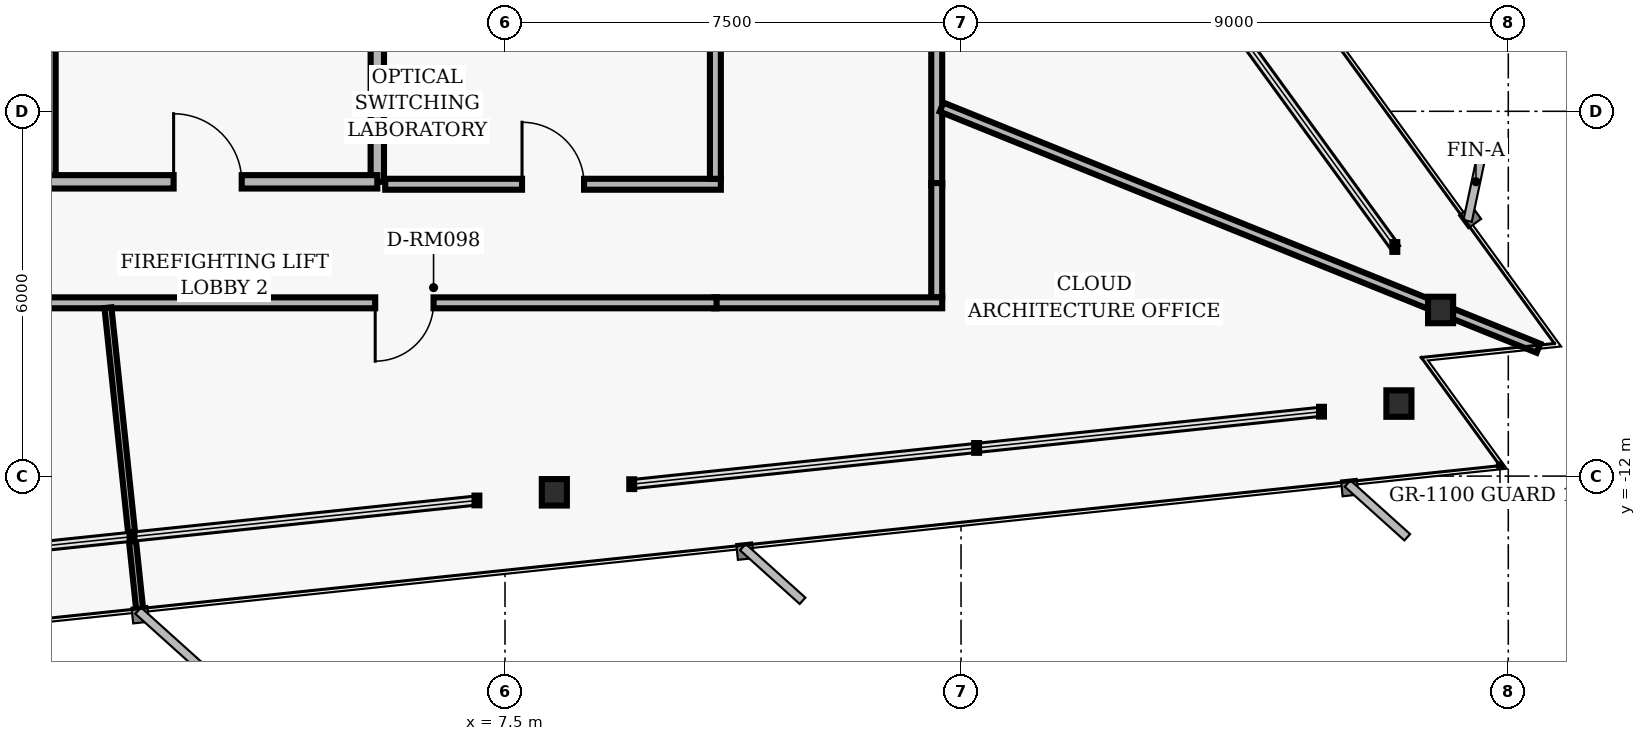
"""IFC4 building model, lengths in metres.
Left out: names, types, materials, properties, quantities, classifications, styles, units other than length and angle.
Written with IfcOpenShell. Run it as: python <this file> out.ifc"""

import sys

from ifc_helpers import new_model, si_unit, direction, frame, frame_2d, origin, origin_2d, place, context, subcontext, project, spatial, rectangle, i_section, extrude, element, fill, save


model = new_model("IFC4")
c1 = context("Model", 3, precision=1e-05, world=origin(), true_north=direction((0.0, 1.0)))
c2 = subcontext(c1, "Body", "Model", "MODEL_VIEW")
j1 = project(units=[si_unit("LENGTHUNIT", "METRE"), si_unit("PLANEANGLEUNIT", "RADIAN")], contexts=[c1])
p1 = place(None, origin())
s1 = spatial("IfcSite", under=j1, at=p1, CompositionType="ELEMENT")
p2 = place(p1, origin())
s2 = spatial("IfcBuilding", under=s1, at=p2, CompositionType="ELEMENT")
p3 = place(p2, frame((0.0, 0.0, 104.64)))
s3 = spatial("IfcBuildingStorey", under=s2, at=p3, CompositionType="ELEMENT", Elevation=104.64)
for number, where, z_axis, x_axis in (
    (1, (22.887, -9.268, 0.0), (0.0, 0.0, 1.0), (1.0, 0.0, 0.0)),
    (2, (8.311, -12.267, 0.0), (0.0, 0.0, 1.0), (1.0, 0.0, 0.0)),
    (3, (22.201, -10.807, 0.0), (0.0, 0.0, 1.0), (1.0, 0.0, 0.0)),
):
    element("IfcColumn", number, at=place(p3, frame(where, z_axis=z_axis, x_axis=x_axis)), inside=s3, PredefinedType="COLUMN", context=c2, shape_type="SweptSolid", body=[
        extrude(i_section(OverallWidth=0.412, OverallDepth=0.435, WebThickness=0.036, FlangeThickness=0.057, FilletRadius=0.022, at=origin_2d()), origin(), (0.0, 0.0, 1.0), 3.04),
    ])
p4 = place(p3, frame((5.4, -7.16, 0.0), z_axis=(0.0, 0.0, 1.0), x_axis=(0.0, 1.0, 0.0)))
e4 = element("IfcWall", 4, at=p4, inside=s3, PredefinedType="PARTITIONING", context=c2, shape_type="SweptSolid", body=[
    extrude(rectangle(XDim=2.71, YDim=0.22, at=frame_2d((1.355, 0.0))), origin(), (0.0, 0.0, 1.0), 2.763),
])
p5 = place(p3, frame((0.0, -7.16, 0.0), z_axis=(0.0, 0.0, 1.0), x_axis=(0.0, 1.0, 0.0)))
e5 = element("IfcWall", 5, at=p5, inside=s3, PredefinedType="PARTITIONING", context=c2, shape_type="SweptSolid", body=[
    extrude(rectangle(XDim=2.81, YDim=0.22, at=frame_2d((1.405, 0.0))), origin(), (0.0, 0.0, 1.0), 2.763),
])
p6 = place(p3, frame((0.0, -7.16, 0.0), z_axis=(0.0, 0.0, 1.0), x_axis=(1.0, 0.0, 0.0)))
e6 = element("IfcWall", 6, at=p6, inside=s3, PredefinedType="PARTITIONING", context=c2, shape_type="SweptSolid", body=[
    extrude(rectangle(XDim=5.4, YDim=0.22, at=frame_2d((2.7, 0.0))), origin(), (0.0, 0.0, 1.0), 2.33),
])
p7 = place(p6, frame((2.05, 0.0, 0.0)))
e7 = element("IfcOpeningElement", 7, at=p7, cuts=e6, PredefinedType="OPENING", context=c2, shape_type="SweptSolid", body=[
    extrude(rectangle(XDim=1.12, YDim=2.02, at=frame_2d((0.56, 1.01))), frame((0.0, 0.12, 0.0), z_axis=(0.0, -1.0, 0.0), x_axis=(1.0, 0.0, 0.0)), (0.0, 0.0, 1.0), 0.24),
])
p8 = place(p3, frame((14.6, 3.018, 0.0), z_axis=(0.0, 0.0, 1.0), x_axis=(0.0, -1.0, 0.0)))
e8 = element("IfcWall", 8, at=p8, inside=s3, PredefinedType="PARTITIONING", context=c2, shape_type="SweptSolid", body=[
    extrude(rectangle(XDim=10.238, YDim=0.18, at=frame_2d((5.119, 0.0))), origin(), (0.0, 0.0, 1.0), 2.763),
])
p9 = place(p8, frame((4.124, 0.0, 0.0)))
e9 = element("IfcOpeningElement", 9, at=p9, cuts=e8, PredefinedType="OPENING", context=c2, shape_type="SweptSolid", body=[
    extrude(rectangle(XDim=0.96, YDim=2.02, at=frame_2d((0.48, 1.01))), frame((0.0, 0.1, 0.0), z_axis=(0.0, -1.0, 0.0), x_axis=(1.0, 0.0, 0.0)), (0.0, 0.0, 1.0), 0.2),
])
p10 = place(p3, frame((14.6, -7.18, 0.0), z_axis=(0.0, 0.0, 1.0), x_axis=(0.0, -1.0, 0.0)))
e10 = element("IfcWall", 10, at=p10, inside=s3, PredefinedType="PARTITIONING", context=c2, shape_type="SweptSolid", body=[
    extrude(rectangle(XDim=1.88, YDim=0.18, at=frame_2d((0.94, 0.0))), origin(), (0.0, 0.0, 1.0), 2.763),
])
p11 = place(p3, frame((14.69, -9.15, 0.0), z_axis=(0.0, 0.0, 1.0), x_axis=(-1.0, 0.0, 0.0)))
e11 = element("IfcWall", 11, at=p11, inside=s3, PredefinedType="PARTITIONING", context=c2, shape_type="SweptSolid", body=[
    extrude(rectangle(XDim=3.75, YDim=0.18, at=frame_2d((1.875, 0.0))), origin(), (0.0, 0.0, 1.0), 2.33),
])
p12 = place(p3, frame((10.98, -9.15, 0.0), z_axis=(0.0, 0.0, 1.0), x_axis=(-1.0, 0.0, 0.0)))
e12 = element("IfcWall", 12, at=p12, inside=s3, PredefinedType="PARTITIONING", context=c2, shape_type="SweptSolid", body=[
    extrude(rectangle(XDim=17.5, YDim=0.18, at=frame_2d((8.75, 0.0))), origin(), (0.0, 0.0, 1.0), 2.33),
])
p13 = place(p12, frame((13.145, 0.0, 0.0)))
e13 = element("IfcOpeningElement", 13, at=p13, cuts=e12, PredefinedType="OPENING", context=c2, shape_type="SweptSolid", body=[
    extrude(rectangle(XDim=0.96, YDim=2.02, at=frame_2d((0.48, 1.01))), frame((0.0, 0.1, 0.0), z_axis=(0.0, -1.0, 0.0), x_axis=(1.0, 0.0, 0.0)), (0.0, 0.0, 1.0), 0.2),
])
p14 = place(p12, frame((4.655, 0.0, 0.0)))
e14 = element("IfcOpeningElement", 14, at=p14, cuts=e12, PredefinedType="OPENING", context=c2, shape_type="SweptSolid", body=[
    extrude(rectangle(XDim=0.96, YDim=2.02, at=frame_2d((0.48, 1.01))), frame((0.0, 0.1, 0.0), z_axis=(0.0, -1.0, 0.0), x_axis=(1.0, 0.0, 0.0)), (0.0, 0.0, 1.0), 0.2),
])
p15 = place(p3, frame((5.53, -7.2, 0.0), z_axis=(0.0, 0.0, 1.0), x_axis=(1.0, 0.0, 0.0)))
e15 = element("IfcWall", 15, at=p15, inside=s3, PredefinedType="PARTITIONING", context=c2, shape_type="SweptSolid", body=[
    extrude(rectangle(XDim=5.52, YDim=0.18, at=frame_2d((2.76, 0.0))), origin(), (0.0, 0.0, 1.0), 2.33),
])
p16 = place(p15, frame((2.25, 0.0, 0.0)))
e16 = element("IfcOpeningElement", 16, at=p16, cuts=e15, PredefinedType="OPENING", context=c2, shape_type="SweptSolid", body=[
    extrude(rectangle(XDim=1.02, YDim=2.02, at=frame_2d((0.51, 1.01))), frame((0.0, 0.1, 0.0), z_axis=(0.0, -1.0, 0.0), x_axis=(1.0, 0.0, 0.0)), (0.0, 0.0, 1.0), 0.2),
])
p17 = place(p3, frame((10.96, -7.11, 0.0), z_axis=(0.0, 0.0, 1.0), x_axis=(0.0, 1.0, 0.0)))
e17 = element("IfcWall", 17, at=p17, inside=s3, PredefinedType="PARTITIONING", context=c2, shape_type="SweptSolid", body=[
    extrude(rectangle(XDim=3.271, YDim=0.18, at=frame_2d((1.635, 0.0))), origin(), (0.0, 0.0, 1.0), 2.763),
])
p18 = place(p3, frame((0.97, -9.23, 0.0), z_axis=(0.0, 0.0, 1.0), x_axis=(0.104502779655, -0.994524594489, 0.0)))
e18 = element("IfcWall", 18, at=p18, inside=s3, PredefinedType="MOVABLE", context=c2, shape_type="SweptSolid", body=[
    extrude(rectangle(XDim=5.028, YDim=0.115, at=frame_2d((2.514, 0.0))), origin(), (0.0, 0.0, 1.0), 2.763),
])
p19 = place(p3, frame((14.68, -5.931, 0.0), z_axis=(0.0, 0.0, 1.0), x_axis=(0.927187622353, -0.374597267682, 0.0)))
e19 = element("IfcWall", 19, at=p19, inside=s3, PredefinedType="PARTITIONING", context=c2, shape_type="SweptSolid", body=[
    extrude(rectangle(XDim=10.586, YDim=0.16, at=frame_2d((5.293, 0.0))), origin(), (0.0, 0.0, 1.0), 2.132),
])
p20 = place(p7, origin())
e20 = element("IfcDoor", 20, at=p20, inside=s3, OperationType="SINGLE_SWING_LEFT", PredefinedType="DOOR", context=c2, shape_type="SweptSolid", body=[
    extrude(rectangle(XDim=1.12, YDim=2.02, at=frame_2d((0.56, 1.01))), frame((0.0, 0.025, 0.0), z_axis=(0.0, -1.0, 0.0), x_axis=(1.0, 0.0, 0.0)), (0.0, 0.0, 1.0), 0.05),
])
fill(e7, e20)
p21 = place(p14, origin())
e21 = element("IfcDoor", 21, at=p21, inside=s3, OperationType="SINGLE_SWING_RIGHT", PredefinedType="DOOR", context=c2, shape_type="SweptSolid", body=[
    extrude(rectangle(XDim=0.96, YDim=2.02, at=frame_2d((0.48, 1.01))), frame((0.0, 0.025, 0.0), z_axis=(0.0, -1.0, 0.0), x_axis=(1.0, 0.0, 0.0)), (0.0, 0.0, 1.0), 0.05),
])
fill(e14, e21)
p22 = place(p16, origin())
e22 = element("IfcDoor", 22, at=p22, inside=s3, OperationType="SINGLE_SWING_LEFT", PredefinedType="DOOR", context=c2, shape_type="SweptSolid", body=[
    extrude(rectangle(XDim=1.02, YDim=2.02, at=frame_2d((0.51, 1.01))), frame((0.0, 0.025, 0.0), z_axis=(0.0, -1.0, 0.0), x_axis=(1.0, 0.0, 0.0)), (0.0, 0.0, 1.0), 0.05),
])
fill(e16, e22)
save(model, sys.argv[1])
